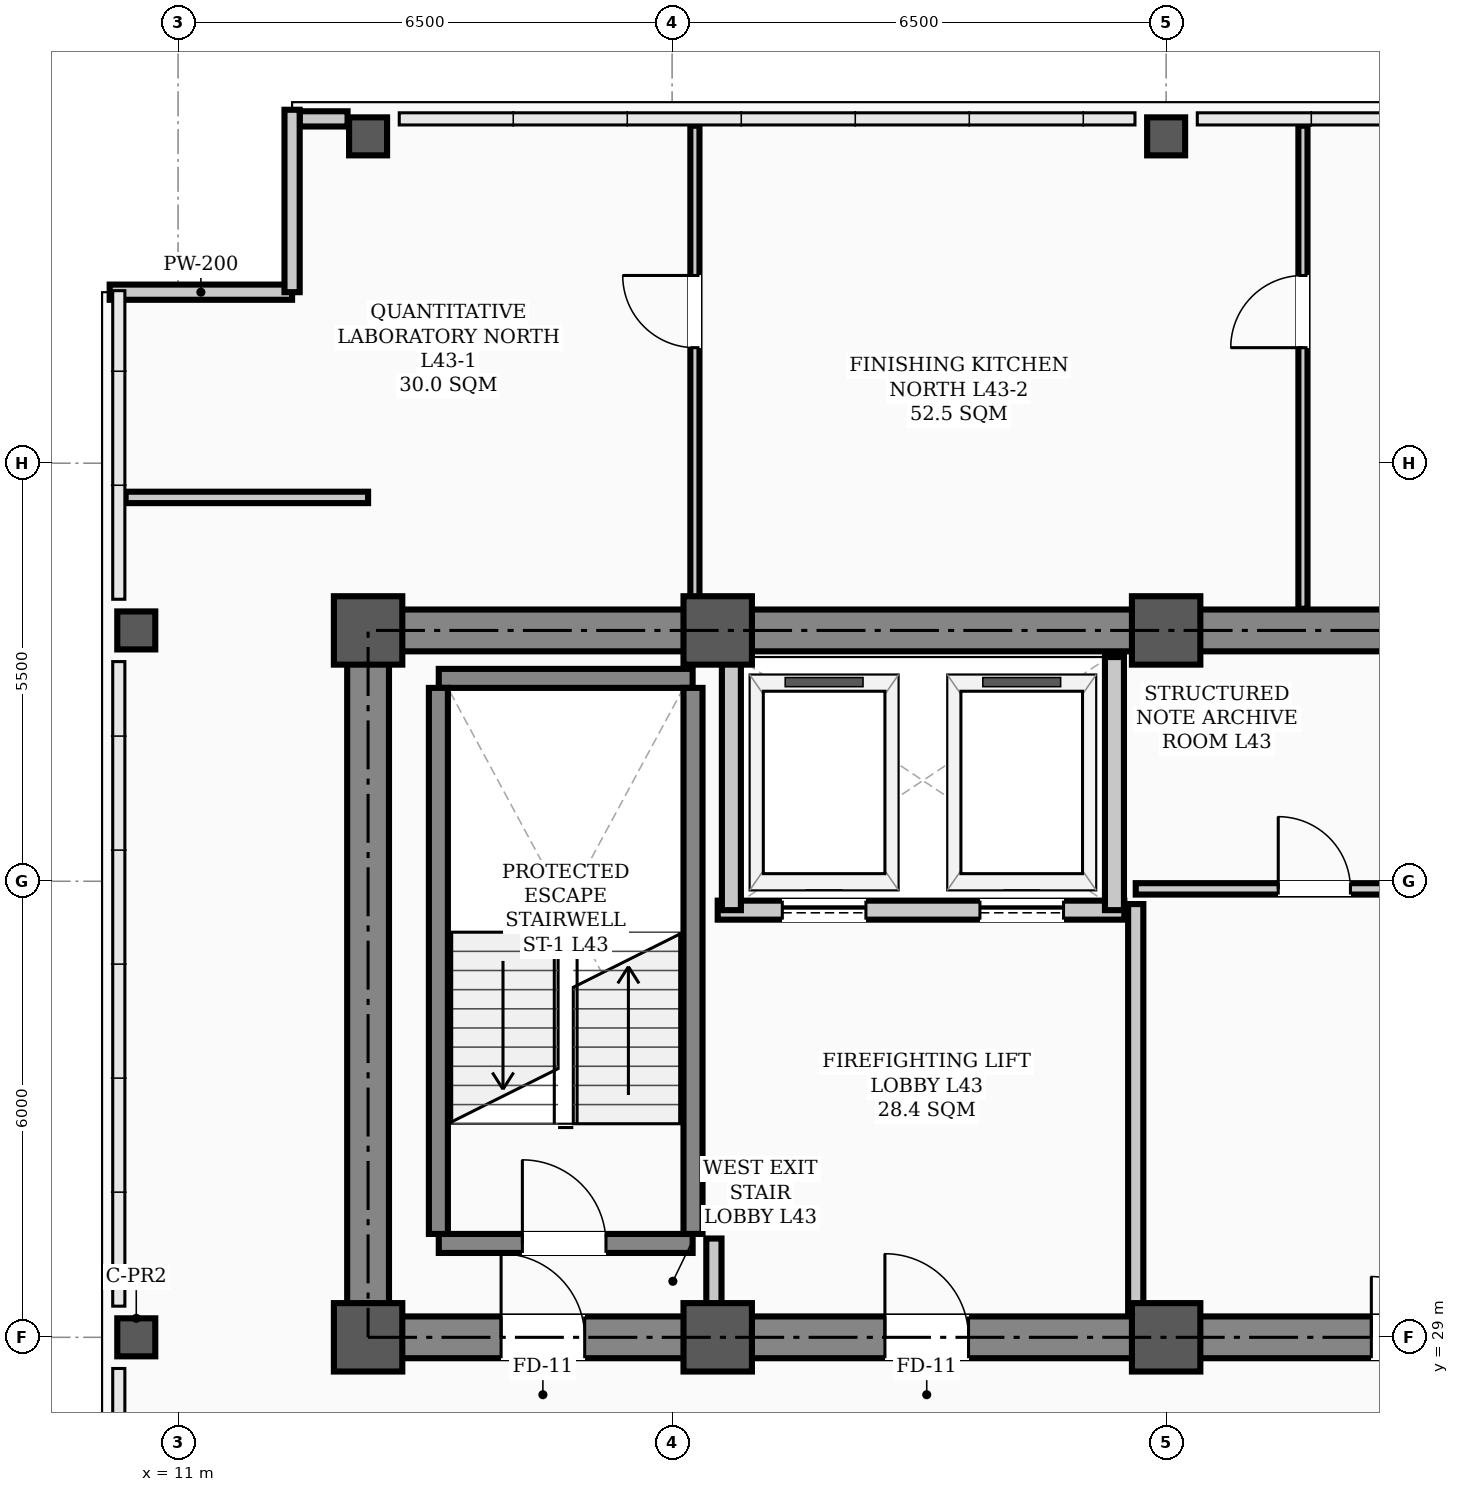
"""IFC4 building model, lengths in metres.
Left out: names, types, materials, properties, quantities, classifications, styles, units other than length and angle.
Written with IfcOpenShell. Run it as: python <this file> out.ifc"""

import sys

from ifc_helpers import new_model, si_unit, direction, frame, frame_2d, origin, origin_2d, place, context, subcontext, project, spatial, rectangle, hollow_rectangle, extrude, element, fill, save


model = new_model("IFC4")
c1 = context("Model", 3, precision=1e-05, world=origin(), true_north=direction((0.0, 1.0)))
c2 = subcontext(c1, "Body", "Model", "MODEL_VIEW")
j1 = project(units=[si_unit("LENGTHUNIT", "METRE"), si_unit("PLANEANGLEUNIT", "RADIAN")], contexts=[c1])
p1 = place(None, origin())
s1 = spatial("IfcSite", under=j1, at=p1, CompositionType="ELEMENT")
p2 = place(p1, origin())
s2 = spatial("IfcBuilding", under=s1, at=p2, CompositionType="ELEMENT")
p3 = place(p2, frame((0.0, 0.0, 173.4)))
s3 = spatial("IfcBuildingStorey", under=s2, at=p3, CompositionType="ELEMENT", Elevation=173.4)
for number, where, z_axis, x_axis in (
    (1, (13.5, 29.0, 0.0), (0.0, 0.0, 1.0), (1.0, 0.0, 0.0)),
    (2, (13.5, 38.3, 0.0), (0.0, 0.0, 1.0), (1.0, 0.0, 0.0)),
    (3, (18.1, 29.0, 0.0), (0.0, 0.0, 1.0), (1.0, 0.0, 0.0)),
    (4, (18.1, 38.3, 0.0), (0.0, 0.0, 1.0), (1.0, 0.0, 0.0)),
    (5, (24.0, 29.0, 0.0), (0.0, 0.0, 1.0), (1.0, 0.0, 0.0)),
    (6, (24.0, 38.3, 0.0), (0.0, 0.0, 1.0), (1.0, 0.0, 0.0)),
):
    element("IfcColumn", number, at=place(p3, frame(where, z_axis=z_axis, x_axis=x_axis)), inside=s3, PredefinedType="COLUMN", context=c2, shape_type="SweptSolid", body=[
        extrude(hollow_rectangle(XDim=0.9, YDim=0.9, WallThickness=0.035, InnerFilletRadius=0.017, OuterFilletRadius=0.052, at=origin_2d()), origin(), (0.0, 0.0, 1.0), 3.9),
    ])
for number, where, z_axis, x_axis in (
    (7, (10.45, 29.0, 0.0), (0.0, 0.0, 1.0), (1.0, 0.0, 0.0)),
    (8, (10.45, 38.3, 0.0), (0.0, 0.0, 1.0), (1.0, 0.0, 0.0)),
    (9, (13.5, 44.8, 0.0), (0.0, 0.0, 1.0), (1.0, 0.0, 0.0)),
    (10, (24.0, 44.8, 0.0), (0.0, 0.0, 1.0), (1.0, 0.0, 0.0)),
):
    element("IfcColumn", number, at=place(p3, frame(where, z_axis=z_axis, x_axis=x_axis)), inside=s3, PredefinedType="COLUMN", context=c2, shape_type="SweptSolid", body=[
        extrude(hollow_rectangle(XDim=0.5, YDim=0.5, WallThickness=0.024, InnerFilletRadius=0.012, OuterFilletRadius=0.036, at=origin_2d()), origin(), (0.0, 0.0, 1.0), 3.9),
    ])
p4 = place(p3, frame((12.6, 45.03, 0.0), z_axis=(0.0, 0.0, 1.0), x_axis=(1.0, 0.0, 0.0)))
e11 = element("IfcWall", 11, at=p4, inside=s3, PredefinedType="PARAPET", context=c2, shape_type="SweptSolid", body=[
    extrude(rectangle(XDim=0.63, YDim=0.2, at=frame_2d((0.315, 0.0))), origin(), (0.0, 0.0, 1.0), 1.2),
])
for number, where, z_axis, x_axis in (
    (12, (10.1, 42.75, 0.0), (0.0, 0.0, 1.0), (1.0, 0.0, 0.0)),
    (13, (12.5, 42.75, 0.0), (0.0, 0.0, 1.0), (0.0, 1.0, 0.0)),
):
    element("IfcWall", number, at=place(p3, frame(where, z_axis=z_axis, x_axis=x_axis)), inside=s3, PredefinedType="PARAPET", context=c2, shape_type="SweptSolid", body=[
        extrude(rectangle(XDim=2.4, YDim=0.2, at=frame_2d((1.2, 0.0))), origin(), (0.0, 0.0, 1.0), 1.2),
    ])
p5 = place(p3, frame((13.5, 29.0, 0.0), z_axis=(0.0, 0.0, 1.0), x_axis=(1.0, 0.0, 0.0)))
e14 = element("IfcWall", 14, at=p5, inside=s3, PredefinedType="SHEAR", context=c2, shape_type="SweptSolid", body=[
    extrude(rectangle(XDim=30.5, YDim=0.55, at=frame_2d((15.25, 0.0))), origin(), (0.0, 0.0, 1.0), 3.72),
])
p6 = place(p5, frame((1.75, 0.0, 0.0)))
e15 = element("IfcOpeningElement", 15, at=p6, cuts=e14, PredefinedType="OPENING", context=c2, shape_type="SweptSolid", body=[
    extrude(rectangle(XDim=1.1, YDim=2.08, at=frame_2d((0.55, 1.04))), frame((0.0, 0.285, 0.0), z_axis=(0.0, -1.0, 0.0), x_axis=(1.0, 0.0, 0.0)), (0.0, 0.0, 1.0), 0.57),
])
p7 = place(p5, frame((26.7, 0.0, 0.0)))
e16 = element("IfcOpeningElement", 16, at=p7, cuts=e14, PredefinedType="OPENING", context=c2, shape_type="SweptSolid", body=[
    extrude(rectangle(XDim=1.1, YDim=2.08, at=frame_2d((0.55, 1.04))), frame((0.0, 0.285, 0.0), z_axis=(0.0, -1.0, 0.0), x_axis=(1.0, 0.0, 0.0)), (0.0, 0.0, 1.0), 0.57),
])
p8 = place(p5, frame((6.8, 0.0, 0.0)))
e17 = element("IfcOpeningElement", 17, at=p8, cuts=e14, PredefinedType="OPENING", context=c2, shape_type="SweptSolid", body=[
    extrude(rectangle(XDim=1.1, YDim=2.08, at=frame_2d((0.55, 1.04))), frame((0.0, 0.285, 0.0), z_axis=(0.0, -1.0, 0.0), x_axis=(1.0, 0.0, 0.0)), (0.0, 0.0, 1.0), 0.57),
])
p9 = place(p5, frame((13.2, 0.0, 0.0)))
e18 = element("IfcOpeningElement", 18, at=p9, cuts=e14, PredefinedType="OPENING", context=c2, shape_type="SweptSolid", body=[
    extrude(rectangle(XDim=1.6, YDim=2.08, at=frame_2d((0.8, 1.04))), frame((0.0, 0.285, 0.0), z_axis=(0.0, -1.0, 0.0), x_axis=(1.0, 0.0, 0.0)), (0.0, 0.0, 1.0), 0.57),
])
p10 = place(p5, frame((19.6, 0.0, 0.0)))
e19 = element("IfcOpeningElement", 19, at=p10, cuts=e14, PredefinedType="OPENING", context=c2, shape_type="SweptSolid", body=[
    extrude(rectangle(XDim=0.9, YDim=2.08, at=frame_2d((0.45, 1.04))), frame((0.0, 0.285, 0.0), z_axis=(0.0, -1.0, 0.0), x_axis=(1.0, 0.0, 0.0)), (0.0, 0.0, 1.0), 0.57),
])
p11 = place(p5, frame((21.6, 0.0, 0.0)))
e20 = element("IfcOpeningElement", 20, at=p11, cuts=e14, PredefinedType="OPENING", context=c2, shape_type="SweptSolid", body=[
    extrude(rectangle(XDim=0.9, YDim=2.08, at=frame_2d((0.45, 1.04))), frame((0.0, 0.285, 0.0), z_axis=(0.0, -1.0, 0.0), x_axis=(1.0, 0.0, 0.0)), (0.0, 0.0, 1.0), 0.57),
])
p12 = place(p3, frame((13.5, 38.3, 0.0), z_axis=(0.0, 0.0, 1.0), x_axis=(1.0, 0.0, 0.0)))
e21 = element("IfcWall", 21, at=p12, inside=s3, PredefinedType="SHEAR", context=c2, shape_type="SweptSolid", body=[
    extrude(rectangle(XDim=30.5, YDim=0.55, at=frame_2d((15.25, 0.0))), origin(), (0.0, 0.0, 1.0), 3.72),
])
p13 = place(p3, frame((13.5, 29.35, 0.0), z_axis=(0.0, 0.0, 1.0), x_axis=(0.0, 1.0, 0.0)))
e22 = element("IfcWall", 22, at=p13, inside=s3, PredefinedType="SHEAR", context=c2, shape_type="SweptSolid", body=[
    extrude(rectangle(XDim=8.6, YDim=0.55, at=frame_2d((4.3, 0.0))), origin(), (0.0, 0.0, 1.0), 3.72),
])
p14 = place(p3, frame((14.43, 30.235, 0.0), z_axis=(0.0, 0.0, 1.0), x_axis=(1.0, 0.0, 0.0)))
e23 = element("IfcWall", 23, at=p14, inside=s3, PredefinedType="STANDARD", context=c2, shape_type="SweptSolid", body=[
    extrude(rectangle(XDim=3.34, YDim=0.25, at=frame_2d((1.67, 0.0))), origin(), (0.0, 0.0, 1.0), 3.72),
])
p15 = place(p14, frame((1.1, 0.0, 0.0)))
e24 = element("IfcOpeningElement", 24, at=p15, cuts=e23, PredefinedType="OPENING", context=c2, shape_type="SweptSolid", body=[
    extrude(rectangle(XDim=1.1, YDim=2.08, at=frame_2d((0.55, 1.04))), frame((0.0, 0.135, 0.0), z_axis=(0.0, -1.0, 0.0), x_axis=(1.0, 0.0, 0.0)), (0.0, 0.0, 1.0), 0.27),
])
p16 = place(p3, frame((14.43, 37.669, 0.0), z_axis=(0.0, 0.0, 1.0), x_axis=(1.0, 0.0, 0.0)))
e25 = element("IfcWall", 25, at=p16, inside=s3, PredefinedType="STANDARD", context=c2, shape_type="SweptSolid", body=[
    extrude(rectangle(XDim=3.34, YDim=0.25, at=frame_2d((1.67, 0.0))), origin(), (0.0, 0.0, 1.0), 3.72),
])
for number, where, z_axis, x_axis in (
    (26, (14.425, 30.36, 0.0), (0.0, 0.0, 1.0), (0.0, 1.0, 0.0)),
    (27, (17.775, 30.36, 0.0), (0.0, 0.0, 1.0), (0.0, 1.0, 0.0)),
):
    element("IfcWall", number, at=place(p3, frame(where, z_axis=z_axis, x_axis=x_axis)), inside=s3, PredefinedType="STANDARD", context=c2, shape_type="SweptSolid", body=[
        extrude(rectangle(XDim=7.184, YDim=0.25, at=frame_2d((3.592, 0.0))), origin(), (0.0, 0.0, 1.0), 3.72),
    ])
p17 = place(p3, frame((18.1, 34.62, 0.0), z_axis=(0.0, 0.0, 1.0), x_axis=(1.0, 0.0, 0.0)))
e28 = element("IfcWall", 28, at=p17, inside=s3, PredefinedType="STANDARD", context=c2, shape_type="SweptSolid", body=[
    extrude(rectangle(XDim=5.35, YDim=0.25, at=frame_2d((2.675, 0.0))), origin(), (0.0, 0.0, 1.0), 3.72),
])
p18 = place(p17, frame((0.85, 0.0, 0.0)))
e29 = element("IfcOpeningElement", 29, at=p18, cuts=e28, PredefinedType="OPENING", context=c2, shape_type="SweptSolid", body=[
    extrude(rectangle(XDim=1.1, YDim=2.08, at=frame_2d((0.55, 1.04))), frame((0.0, 0.135, 0.0), z_axis=(0.0, -1.0, 0.0), x_axis=(1.0, 0.0, 0.0)), (0.0, 0.0, 1.0), 0.27),
])
p19 = place(p17, frame((3.45, 0.0, 0.0)))
e30 = element("IfcOpeningElement", 30, at=p19, cuts=e28, PredefinedType="OPENING", context=c2, shape_type="SweptSolid", body=[
    extrude(rectangle(XDim=1.1, YDim=2.08, at=frame_2d((0.55, 1.04))), frame((0.0, 0.135, 0.0), z_axis=(0.0, -1.0, 0.0), x_axis=(1.0, 0.0, 0.0)), (0.0, 0.0, 1.0), 0.27),
])
for number, where, z_axis, x_axis in (
    (31, (18.28, 34.62, 0.0), (0.0, 0.0, 1.0), (0.0, 1.0, 0.0)),
    (32, (23.32, 34.62, 0.0), (0.0, 0.0, 1.0), (0.0, 1.0, 0.0)),
):
    element("IfcWall", number, at=place(p3, frame(where, z_axis=z_axis, x_axis=x_axis)), inside=s3, PredefinedType="STANDARD", context=c2, shape_type="SweptSolid", body=[
        extrude(rectangle(XDim=3.33, YDim=0.25, at=frame_2d((1.665, 0.0))), origin(), (0.0, 0.0, 1.0), 3.35),
    ])
p20 = place(p3, frame((23.6, 34.9, 0.0), z_axis=(0.0, 0.0, 1.0), x_axis=(1.0, 0.0, 0.0)))
e33 = element("IfcWall", 33, at=p20, inside=s3, PredefinedType="PARTITIONING", context=c2, shape_type="SweptSolid", body=[
    extrude(rectangle(XDim=4.58, YDim=0.15, at=frame_2d((2.29, 0.0))), origin(), (0.0, 0.0, 1.0), 3.72),
])
p21 = place(p20, frame((1.875, 0.0, 0.0)))
e34 = element("IfcOpeningElement", 34, at=p21, cuts=e33, PredefinedType="OPENING", context=c2, shape_type="SweptSolid", body=[
    extrude(rectangle(XDim=0.95, YDim=2.08, at=frame_2d((0.475, 1.04))), frame((0.0, 0.085, 0.0), z_axis=(0.0, -1.0, 0.0), x_axis=(1.0, 0.0, 0.0)), (0.0, 0.0, 1.0), 0.17),
])
p22 = place(p3, frame((10.31, 40.05, 0.0), z_axis=(0.0, 0.0, 1.0), x_axis=(1.0, 0.0, 0.0)))
e35 = element("IfcWall", 35, at=p22, inside=s3, PredefinedType="PARTITIONING", context=c2, shape_type="SweptSolid", body=[
    extrude(rectangle(XDim=3.19, YDim=0.15, at=frame_2d((1.595, 0.0))), origin(), (0.0, 0.0, 1.0), 3.2),
])
p23 = place(p3, frame((18.05, 29.285, 0.0), z_axis=(0.0, 0.0, 1.0), x_axis=(0.0, 1.0, 0.0)))
e36 = element("IfcWall", 36, at=p23, inside=s3, PredefinedType="STANDARD", context=c2, shape_type="SweptSolid", body=[
    extrude(rectangle(XDim=1.015, YDim=0.2, at=frame_2d((0.508, 0.0))), origin(), (0.0, 0.0, 1.0), 3.35),
])
p24 = place(p3, frame((23.6, 29.285, 0.0), z_axis=(0.0, 0.0, 1.0), x_axis=(0.0, 1.0, 0.0)))
e37 = element("IfcWall", 37, at=p24, inside=s3, PredefinedType="STANDARD", context=c2, shape_type="SweptSolid", body=[
    extrude(rectangle(XDim=5.415, YDim=0.2, at=frame_2d((2.708, 0.0))), origin(), (0.0, 0.0, 1.0), 3.2),
])
p25 = place(p3, frame((17.8, 38.585, 0.0), z_axis=(0.0, 0.0, 1.0), x_axis=(0.0, 1.0, 0.0)))
e38 = element("IfcWall", 38, at=p25, inside=s3, PredefinedType="PARTITIONING", context=c2, shape_type="SweptSolid", body=[
    extrude(rectangle(XDim=6.355, YDim=0.12, at=frame_2d((3.177, 0.0))), origin(), (0.0, 0.0, 1.0), 3.212),
])
p26 = place(p25, frame((3.435, 0.0, 0.0)))
e39 = element("IfcOpeningElement", 39, at=p26, cuts=e38, PredefinedType="OPENING", context=c2, shape_type="SweptSolid", body=[
    extrude(rectangle(XDim=0.95, YDim=2.08, at=frame_2d((0.475, 1.04))), frame((0.0, 0.07, 0.0), z_axis=(0.0, -1.0, 0.0), x_axis=(1.0, 0.0, 0.0)), (0.0, 0.0, 1.0), 0.14),
])
p27 = place(p3, frame((25.8, 38.585, 0.0), z_axis=(0.0, 0.0, 1.0), x_axis=(0.0, 1.0, 0.0)))
e40 = element("IfcWall", 40, at=p27, inside=s3, PredefinedType="PARTITIONING", context=c2, shape_type="SweptSolid", body=[
    extrude(rectangle(XDim=6.355, YDim=0.12, at=frame_2d((3.177, 0.0))), origin(), (0.0, 0.0, 1.0), 3.212),
])
p28 = place(p27, frame((3.435, 0.0, 0.0)))
e41 = element("IfcOpeningElement", 41, at=p28, cuts=e40, PredefinedType="OPENING", context=c2, shape_type="SweptSolid", body=[
    extrude(rectangle(XDim=0.95, YDim=2.08, at=frame_2d((0.475, 1.04))), frame((0.0, 0.07, 0.0), z_axis=(0.0, -1.0, 0.0), x_axis=(1.0, 0.0, 0.0)), (0.0, 0.0, 1.0), 0.14),
])
p29 = place(p15, origin())
e42 = element("IfcDoor", 42, at=p29, inside=s3, OperationType="SINGLE_SWING_LEFT", PredefinedType="DOOR", context=c2, shape_type="SweptSolid", body=[
    extrude(rectangle(XDim=1.1, YDim=2.08, at=frame_2d((0.55, 1.04))), frame((0.0, 0.025, 0.0), z_axis=(0.0, -1.0, 0.0), x_axis=(1.0, 0.0, 0.0)), (0.0, 0.0, 1.0), 0.05),
])
fill(e24, e42)
p30 = place(p6, origin())
e43 = element("IfcDoor", 43, at=p30, inside=s3, OperationType="SINGLE_SWING_LEFT", PredefinedType="DOOR", context=c2, shape_type="SweptSolid", body=[
    extrude(rectangle(XDim=1.1, YDim=2.08, at=frame_2d((0.55, 1.04))), frame((0.0, 0.025, 0.0), z_axis=(0.0, -1.0, 0.0), x_axis=(1.0, 0.0, 0.0)), (0.0, 0.0, 1.0), 0.05),
])
fill(e15, e43)
p31 = place(p8, origin())
e44 = element("IfcDoor", 44, at=p31, inside=s3, OperationType="SINGLE_SWING_LEFT", PredefinedType="DOOR", context=c2, shape_type="SweptSolid", body=[
    extrude(rectangle(XDim=1.1, YDim=2.08, at=frame_2d((0.55, 1.04))), frame((0.0, 0.025, 0.0), z_axis=(0.0, -1.0, 0.0), x_axis=(1.0, 0.0, 0.0)), (0.0, 0.0, 1.0), 0.05),
])
fill(e17, e44)
p32 = place(p9, origin())
e45 = element("IfcDoor", 45, at=p32, inside=s3, OperationType="DOUBLE_DOOR_SINGLE_SWING", PredefinedType="DOOR", context=c2, shape_type="SweptSolid", body=[
    extrude(rectangle(XDim=1.6, YDim=2.08, at=frame_2d((0.8, 1.04))), frame((0.0, 0.025, 0.0), z_axis=(0.0, -1.0, 0.0), x_axis=(1.0, 0.0, 0.0)), (0.0, 0.0, 1.0), 0.05),
])
fill(e18, e45)
p33 = place(p21, origin())
e46 = element("IfcDoor", 46, at=p33, inside=s3, OperationType="SINGLE_SWING_LEFT", PredefinedType="DOOR", context=c2, shape_type="SweptSolid", body=[
    extrude(rectangle(XDim=0.95, YDim=2.08, at=frame_2d((0.475, 1.04))), frame((0.0, 0.025, 0.0), z_axis=(0.0, -1.0, 0.0), x_axis=(1.0, 0.0, 0.0)), (0.0, 0.0, 1.0), 0.05),
])
fill(e34, e46)
p34 = place(p26, origin())
e47 = element("IfcDoor", 47, at=p34, inside=s3, OperationType="SINGLE_SWING_RIGHT", PredefinedType="DOOR", context=c2, shape_type="SweptSolid", body=[
    extrude(rectangle(XDim=0.95, YDim=2.08, at=frame_2d((0.475, 1.04))), frame((0.0, 0.025, 0.0), z_axis=(0.0, -1.0, 0.0), x_axis=(1.0, 0.0, 0.0)), (0.0, 0.0, 1.0), 0.05),
])
fill(e39, e47)
p35 = place(p28, origin())
e48 = element("IfcDoor", 48, at=p35, inside=s3, OperationType="SINGLE_SWING_LEFT", PredefinedType="DOOR", context=c2, shape_type="SweptSolid", body=[
    extrude(rectangle(XDim=0.95, YDim=2.08, at=frame_2d((0.475, 1.04))), frame((0.0, 0.025, 0.0), z_axis=(0.0, -1.0, 0.0), x_axis=(1.0, 0.0, 0.0)), (0.0, 0.0, 1.0), 0.05),
])
fill(e41, e48)
p36 = place(p18, origin())
e49 = element("IfcDoor", 49, at=p36, inside=s3, OperationType="SLIDING_TO_LEFT", PredefinedType="DOOR", context=c2, shape_type="SweptSolid", body=[
    extrude(rectangle(XDim=1.1, YDim=2.08, at=frame_2d((0.55, 1.04))), frame((0.0, 0.025, 0.0), z_axis=(0.0, -1.0, 0.0), x_axis=(1.0, 0.0, 0.0)), (0.0, 0.0, 1.0), 0.05),
])
fill(e29, e49)
p37 = place(p19, origin())
e50 = element("IfcDoor", 50, at=p37, inside=s3, OperationType="SLIDING_TO_LEFT", PredefinedType="DOOR", context=c2, shape_type="SweptSolid", body=[
    extrude(rectangle(XDim=1.1, YDim=2.08, at=frame_2d((0.55, 1.04))), frame((0.0, 0.025, 0.0), z_axis=(0.0, -1.0, 0.0), x_axis=(1.0, 0.0, 0.0)), (0.0, 0.0, 1.0), 0.05),
])
fill(e30, e50)
save(model, sys.argv[1])
